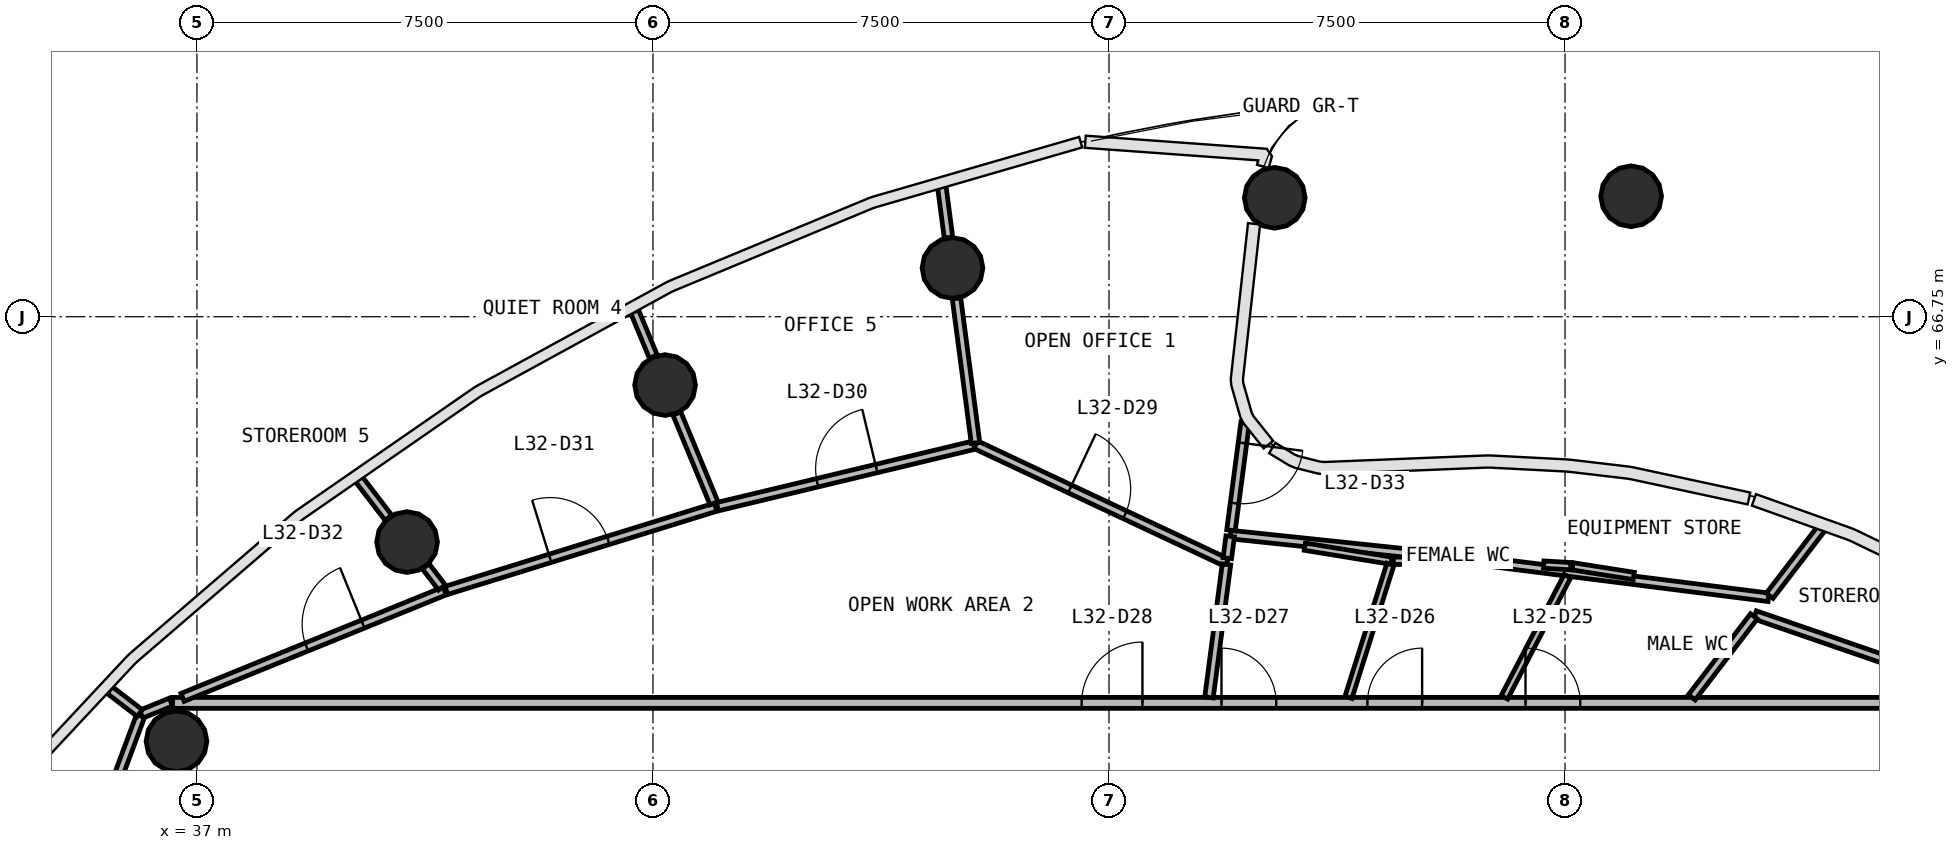
"""IFC4 building model, lengths in metres.
Left out: names, types, materials, properties, quantities, classifications, styles, units other than length and angle.
Written with IfcOpenShell. Run it as: python <this file> out.ifc"""

import sys

from ifc_helpers import new_model, si_unit, direction, frame, frame_2d, origin, origin_2d, place, context, subcontext, project, spatial, rectangle, circle, extrude, source, transform, mapped, element, fill, save


model = new_model("IFC4")
c1 = context("Model", 3, precision=1e-05, world=origin(), true_north=direction((0.0, 1.0)))
c2 = subcontext(c1, "Body", "Model", "MODEL_VIEW")
j1 = project(units=[si_unit("LENGTHUNIT", "METRE"), si_unit("PLANEANGLEUNIT", "RADIAN")], contexts=[c1])
p1 = place(None, origin())
s1 = spatial("IfcSite", under=j1, at=p1, CompositionType="ELEMENT")
p2 = place(p1, origin())
s2 = spatial("IfcBuilding", under=s1, at=p2, CompositionType="ELEMENT")
p3 = place(p2, frame((0.0, 0.0, 137.0)))
s3 = spatial("IfcBuildingStorey", under=s2, at=p3, CompositionType="ELEMENT", Elevation=137.0)
m1 = source(origin(), c2, "Body", "SweptSolid", [
    extrude(circle(Radius=0.5, at=origin_2d()), origin(), (0.0, 0.0, 1.0), 3.9),
])
for number, where, z_axis, x_axis in (
    (1, (60.587, 68.731, 0.0), (0.0, 0.0, 1.0), (1.0, 0.0, 0.0)),
    (2, (54.726, 68.705, 0.0), (0.0, 0.0, 1.0), (1.0, 0.0, 0.0)),
    (3, (49.426, 67.551, 0.0), (0.0, 0.0, 1.0), (1.0, 0.0, 0.0)),
    (4, (44.699, 65.626, 0.0), (0.0, 0.0, 1.0), (1.0, 0.0, 0.0)),
    (5, (40.456, 63.044, 0.0), (0.0, 0.0, 1.0), (1.0, 0.0, 0.0)),
    (6, (36.664, 59.768, 0.0), (0.0, 0.0, 1.0), (1.0, 0.0, 0.0)),
):
    element("IfcColumn", number, at=place(p3, frame(where, z_axis=z_axis, x_axis=x_axis)), inside=s3, PredefinedType="COLUMN", context=c2, shape_type="MappedRepresentation", body=[
        mapped(m1, transform((0.0, 0.0, 0.0), scale=1.0)),
    ])
p4 = place(p3, frame((36.6, 60.4, 0.0), z_axis=(0.0, 0.0, 1.0), x_axis=(1.0, 0.0, 0.0)))
e7 = element("IfcWall", 7, at=p4, inside=s3, PredefinedType="PARTITIONING", context=c2, shape_type="SweptSolid", body=[
    extrude(rectangle(XDim=30.8, YDim=0.18, at=frame_2d((15.4, 0.0))), origin(), (0.0, 0.0, 1.0), 2.88),
])
p5 = place(p4, frame((22.25, 0.0, 0.0)))
e8 = element("IfcOpeningElement", 8, at=p5, cuts=e7, PredefinedType="OPENING", context=c2, shape_type="SweptSolid", body=[
    extrude(rectangle(XDim=0.9, YDim=2.1, at=frame_2d((0.45, 1.05))), frame((0.0, 0.1, 0.0), z_axis=(0.0, -1.0, 0.0), x_axis=(1.0, 0.0, 0.0)), (0.0, 0.0, 1.0), 0.2),
])
p6 = place(p4, frame((19.65, 0.0, 0.0)))
e9 = element("IfcOpeningElement", 9, at=p6, cuts=e7, PredefinedType="OPENING", context=c2, shape_type="SweptSolid", body=[
    extrude(rectangle(XDim=0.9, YDim=2.1, at=frame_2d((0.45, 1.05))), frame((0.0, 0.1, 0.0), z_axis=(0.0, -1.0, 0.0), x_axis=(1.0, 0.0, 0.0)), (0.0, 0.0, 1.0), 0.2),
])
p7 = place(p4, frame((17.25, 0.0, 0.0)))
e10 = element("IfcOpeningElement", 10, at=p7, cuts=e7, PredefinedType="OPENING", context=c2, shape_type="SweptSolid", body=[
    extrude(rectangle(XDim=0.9, YDim=2.1, at=frame_2d((0.45, 1.05))), frame((0.0, 0.1, 0.0), z_axis=(0.0, -1.0, 0.0), x_axis=(1.0, 0.0, 0.0)), (0.0, 0.0, 1.0), 0.2),
])
p8 = place(p4, frame((14.95, 0.0, 0.0)))
e11 = element("IfcOpeningElement", 11, at=p8, cuts=e7, PredefinedType="OPENING", context=c2, shape_type="SweptSolid", body=[
    extrude(rectangle(XDim=1.0, YDim=2.1, at=frame_2d((0.5, 1.05))), frame((0.0, 0.1, 0.0), z_axis=(0.0, -1.0, 0.0), x_axis=(1.0, 0.0, 0.0)), (0.0, 0.0, 1.0), 0.2),
])
p9 = place(p3, frame((36.573, 60.413, 0.0), z_axis=(0.0, 0.0, 1.0), x_axis=(-0.926456511484, -0.376401822961, 0.0)))
e12 = element("IfcWall", 12, at=p9, inside=s3, PredefinedType="PARTITIONING", context=c2, shape_type="SweptSolid", body=[
    extrude(rectangle(XDim=0.529, YDim=0.14, at=frame_2d((0.264, 0.0))), origin(), (0.0, 0.0, 1.0), 2.88),
])
p10 = place(p3, frame((36.763, 60.49, 0.0), z_axis=(0.0, 0.0, 1.0), x_axis=(0.926531191785, 0.376217956309, 0.0)))
e13 = element("IfcWall", 13, at=p10, inside=s3, PredefinedType="PARTITIONING", context=c2, shape_type="SweptSolid", body=[
    extrude(rectangle(XDim=4.652, YDim=0.14, at=frame_2d((2.326, 0.0))), origin(), (0.0, 0.0, 1.0), 2.88),
])
p11 = place(p10, frame((2.202, 0.0, 0.0)))
e14 = element("IfcOpeningElement", 14, at=p11, cuts=e13, PredefinedType="OPENING", context=c2, shape_type="SweptSolid", body=[
    extrude(rectangle(XDim=1.0, YDim=2.1, at=frame_2d((0.5, 1.05))), frame((0.0, 0.08, 0.0), z_axis=(0.0, -1.0, 0.0), x_axis=(1.0, 0.0, 0.0)), (0.0, 0.0, 1.0), 0.16),
])
p12 = place(p3, frame((34.272, 55.343, 0.0), z_axis=(0.0, 0.0, 1.0), x_axis=(0.348465337837, 0.937321667479, 0.0)))
e15 = element("IfcWall", 15, at=p12, inside=s3, PredefinedType="PARTITIONING", context=c2, shape_type="SweptSolid", body=[
    extrude(rectangle(XDim=5.166, YDim=0.14, at=frame_2d((2.583, 0.0))), origin(), (0.0, 0.0, 1.0), 2.88),
])
p13 = place(p12, frame((2.116, 0.0, 0.0)))
e16 = element("IfcOpeningElement", 16, at=p13, cuts=e15, PredefinedType="OPENING", context=c2, shape_type="SweptSolid", body=[
    extrude(rectangle(XDim=1.0, YDim=2.1, at=frame_2d((0.5, 1.05))), frame((0.0, 0.08, 0.0), z_axis=(0.0, -1.0, 0.0), x_axis=(1.0, 0.0, 0.0)), (0.0, 0.0, 1.0), 0.16),
])
p14 = place(p3, frame((62.847, 62.136, 0.0), z_axis=(0.0, 0.0, 1.0), x_axis=(-0.992110428367, 0.125367052792, 0.0)))
e17 = element("IfcWall", 17, at=p14, inside=s3, PredefinedType="PARTITIONING", context=c2, shape_type="SweptSolid", body=[
    extrude(rectangle(XDim=4.781, YDim=0.14, at=frame_2d((2.39, 0.0))), origin(), (0.0, 0.0, 1.0), 2.88),
])
p15 = place(p3, frame((41.102, 62.249, 0.0), z_axis=(0.0, 0.0, 1.0), x_axis=(0.955371566551, 0.295406787033, 0.0)))
e18 = element("IfcWall", 18, at=p15, inside=s3, PredefinedType="PARTITIONING", context=c2, shape_type="SweptSolid", body=[
    extrude(rectangle(XDim=4.635, YDim=0.14, at=frame_2d((2.318, 0.0))), origin(), (0.0, 0.0, 1.0), 2.88),
])
p16 = place(p15, frame((1.786, 0.0, 0.0)))
e19 = element("IfcOpeningElement", 19, at=p16, cuts=e18, PredefinedType="OPENING", context=c2, shape_type="SweptSolid", body=[
    extrude(rectangle(XDim=1.0, YDim=2.1, at=frame_2d((0.5, 1.05))), frame((0.0, 0.08, 0.0), z_axis=(0.0, -1.0, 0.0), x_axis=(1.0, 0.0, 0.0)), (0.0, 0.0, 1.0), 0.16),
])
p17 = place(p3, frame((49.809, 64.645, 0.0), z_axis=(0.0, 0.0, 1.0), x_axis=(0.905123018759, -0.425149762922, 0.0)))
e20 = element("IfcWall", 20, at=p17, inside=s3, PredefinedType="PARTITIONING", context=c2, shape_type="SweptSolid", body=[
    extrude(rectangle(XDim=4.56, YDim=0.14, at=frame_2d((2.28, 0.0))), origin(), (0.0, 0.0, 1.0), 2.88),
])
p18 = place(p17, frame((1.71, 0.0, 0.0)))
e21 = element("IfcOpeningElement", 21, at=p18, cuts=e20, PredefinedType="OPENING", context=c2, shape_type="SweptSolid", body=[
    extrude(rectangle(XDim=1.0, YDim=2.1, at=frame_2d((0.5, 1.05))), frame((0.0, 0.08, 0.0), z_axis=(0.0, -1.0, 0.0), x_axis=(1.0, 0.0, 0.0)), (0.0, 0.0, 1.0), 0.16),
])
p19 = place(p3, frame((66.567, 60.49, 0.0), z_axis=(0.0, 0.0, 1.0), x_axis=(-0.94557008328, 0.325418526834, 0.0)))
e22 = element("IfcWall", 22, at=p19, inside=s3, PredefinedType="PARTITIONING", context=c2, shape_type="SweptSolid", body=[
    extrude(rectangle(XDim=4.169, YDim=0.14, at=frame_2d((2.084, 0.0))), origin(), (0.0, 0.0, 1.0), 2.88),
])
p20 = place(p3, frame((45.56, 63.625, 0.0), z_axis=(0.0, 0.0, 1.0), x_axis=(0.972376576892, 0.233417635821, 0.0)))
e23 = element("IfcWall", 23, at=p20, inside=s3, PredefinedType="PARTITIONING", context=c2, shape_type="SweptSolid", body=[
    extrude(rectangle(XDim=4.34, YDim=0.14, at=frame_2d((2.17, 0.0))), origin(), (0.0, 0.0, 1.0), 2.88),
])
p21 = place(p20, frame((1.689, 0.0, 0.0)))
e24 = element("IfcOpeningElement", 24, at=p21, cuts=e23, PredefinedType="OPENING", context=c2, shape_type="SweptSolid", body=[
    extrude(rectangle(XDim=1.0, YDim=2.1, at=frame_2d((0.5, 1.05))), frame((0.0, 0.08, 0.0), z_axis=(0.0, -1.0, 0.0), x_axis=(1.0, 0.0, 0.0)), (0.0, 0.0, 1.0), 0.16),
])
p22 = place(p3, frame((58.074, 62.739, 0.0), z_axis=(0.0, 0.0, 1.0), x_axis=(-0.994510346773, 0.104638282489, 0.0)))
e25 = element("IfcWall", 25, at=p22, inside=s3, PredefinedType="PARTITIONING", context=c2, shape_type="SweptSolid", body=[
    extrude(rectangle(XDim=4.099, YDim=0.14, at=frame_2d((2.05, 0.0))), origin(), (0.0, 0.0, 1.0), 2.88),
])
p23 = place(p3, frame((49.805, 64.675, 0.0), z_axis=(0.0, 0.0, 1.0), x_axis=(-0.130475590665, 0.991451521881, 0.0)))
e26 = element("IfcWall", 26, at=p23, inside=s3, PredefinedType="PARTITIONING", context=c2, shape_type="SweptSolid", body=[
    extrude(rectangle(XDim=2.397, YDim=0.14, at=frame_2d((1.198, 0.0))), origin(), (0.0, 0.0, 1.0), 2.88),
])
p24 = place(p3, frame((53.644, 60.49, 0.0), z_axis=(0.0, 0.0, 1.0), x_axis=(0.13051751215, 0.991446004088, 0.0)))
e27 = element("IfcWall", 27, at=p24, inside=s3, PredefinedType="PARTITIONING", context=c2, shape_type="SweptSolid", body=[
    extrude(rectangle(XDim=2.205, YDim=0.14, at=frame_2d((1.103, 0.0))), origin(), (0.0, 0.0, 1.0), 2.88),
])
p25 = place(p3, frame((54.24, 65.013, 0.0), z_axis=(0.0, 0.0, 1.0), x_axis=(-0.130458038882, -0.991453831548, 0.0)))
e28 = element("IfcWall", 28, at=p25, inside=s3, PredefinedType="PARTITIONING", context=c2, shape_type="SweptSolid", body=[
    extrude(rectangle(XDim=1.791, YDim=0.14, at=frame_2d((0.896, 0.0))), origin(), (0.0, 0.0, 1.0), 2.88),
])
p26 = place(p25, frame((0.341, 0.0, 0.0)))
e29 = element("IfcOpeningElement", 29, at=p26, cuts=e28, PredefinedType="OPENING", context=c2, shape_type="SweptSolid", body=[
    extrude(rectangle(XDim=1.0, YDim=2.1, at=frame_2d((0.5, 1.05))), frame((0.0, 0.08, 0.0), z_axis=(0.0, -1.0, 0.0), x_axis=(1.0, 0.0, 0.0)), (0.0, 0.0, 1.0), 0.16),
])
p27 = place(p3, frame((62.865, 62.16, 0.0), z_axis=(0.0, 0.0, 1.0), x_axis=(0.608793777292, 0.793328517532, 0.0)))
e30 = element("IfcWall", 30, at=p27, inside=s3, PredefinedType="PARTITIONING", context=c2, shape_type="SweptSolid", body=[
    extrude(rectangle(XDim=1.429, YDim=0.14, at=frame_2d((0.714, 0.0))), origin(), (0.0, 0.0, 1.0), 2.88),
])
p28 = place(p3, frame((61.584, 60.49, 0.0), z_axis=(0.0, 0.0, 1.0), x_axis=(0.608776244605, 0.793341971664, 0.0)))
e31 = element("IfcWall", 31, at=p28, inside=s3, PredefinedType="PARTITIONING", context=c2, shape_type="SweptSolid", body=[
    extrude(rectangle(XDim=1.68, YDim=0.14, at=frame_2d((0.84, 0.0))), origin(), (0.0, 0.0, 1.0), 2.88),
])
p29 = place(p3, frame((45.504, 63.683, 0.0), z_axis=(0.0, 0.0, 1.0), x_axis=(-0.382770137499, 0.923843613302, 0.0)))
e32 = element("IfcWall", 32, at=p29, inside=s3, PredefinedType="PARTITIONING", context=c2, shape_type="SweptSolid", body=[
    extrude(rectangle(XDim=1.598, YDim=0.14, at=frame_2d((0.799, 0.0))), origin(), (0.0, 0.0, 1.0), 2.88),
])
p30 = place(p3, frame((49.36, 68.052, 0.0), z_axis=(0.0, 0.0, 1.0), x_axis=(-0.130499323257, 0.99144839837, 0.0)))
e33 = element("IfcWall", 33, at=p30, inside=s3, PredefinedType="PARTITIONING", context=c2, shape_type="SweptSolid", body=[
    extrude(rectangle(XDim=0.846, YDim=0.14, at=frame_2d((0.423, 0.0))), origin(), (0.0, 0.0, 1.0), 2.88),
])
p31 = place(p3, frame((44.506, 66.092, 0.0), z_axis=(0.0, 0.0, 1.0), x_axis=(-0.382655293316, 0.923891187585, 0.0)))
e34 = element("IfcWall", 34, at=p31, inside=s3, PredefinedType="PARTITIONING", context=c2, shape_type="SweptSolid", body=[
    extrude(rectangle(XDim=0.805, YDim=0.14, at=frame_2d((0.403, 0.0))), origin(), (0.0, 0.0, 1.0), 2.88),
])
p32 = place(p3, frame((40.149, 63.445, 0.0), z_axis=(0.0, 0.0, 1.0), x_axis=(-0.60864917868, 0.793439460383, 0.0)))
e35 = element("IfcWall", 35, at=p32, inside=s3, PredefinedType="PARTITIONING", context=c2, shape_type="SweptSolid", body=[
    extrude(rectangle(XDim=0.801, YDim=0.14, at=frame_2d((0.4, 0.0))), origin(), (0.0, 0.0, 1.0), 2.88),
])
p33 = place(p3, frame((36.059, 60.232, 0.0), z_axis=(0.0, 0.0, 1.0), x_axis=(-0.79330932609, 0.608818785139, 0.0)))
e36 = element("IfcWall", 36, at=p33, inside=s3, PredefinedType="PARTITIONING", context=c2, shape_type="SweptSolid", body=[
    extrude(rectangle(XDim=0.622, YDim=0.14, at=frame_2d((0.311, 0.0))), origin(), (0.0, 0.0, 1.0), 2.88),
])
p34 = place(p3, frame((41.029, 62.298, 0.0), z_axis=(0.0, 0.0, 1.0), x_axis=(-0.608548852833, 0.793516410489, 0.0)))
e37 = element("IfcWall", 37, at=p34, inside=s3, PredefinedType="PARTITIONING", context=c2, shape_type="SweptSolid", body=[
    extrude(rectangle(XDim=0.437, YDim=0.14, at=frame_2d((0.219, 0.0))), origin(), (0.0, 0.0, 1.0), 2.88),
])
p35 = place(p3, frame((53.946, 62.779, 0.0), z_axis=(0.0, 0.0, 1.0), x_axis=(0.130262459178, 0.991479546803, 0.0)))
e38 = element("IfcWall", 38, at=p35, inside=s3, PredefinedType="PARTITIONING", context=c2, shape_type="SweptSolid", body=[
    extrude(rectangle(XDim=0.362, YDim=0.14, at=frame_2d((0.181, 0.0))), origin(), (0.0, 0.0, 1.0), 2.88),
])
p36 = place(p3, frame((60.63, 62.487, 0.0), z_axis=(0.0, 0.0, 1.0), x_axis=(-0.987714333962, 0.156270261039, 0.0)))
e39 = element("IfcWall", 39, at=p36, inside=s3, PredefinedType="PARTITIONING", context=c2, shape_type="SweptSolid", body=[
    extrude(rectangle(XDim=1.019, YDim=0.12, at=frame_2d((0.509, 0.0))), origin(), (0.0, 0.0, 1.0), 2.88),
])
p37 = place(p3, frame((56.646, 62.736, 0.0), z_axis=(0.0, 0.0, 1.0), x_axis=(-0.987012882101, 0.160641123522, 0.0)))
e40 = element("IfcWall", 40, at=p37, inside=s3, PredefinedType="PARTITIONING", context=c2, shape_type="SweptSolid", body=[
    extrude(rectangle(XDim=1.444, YDim=0.12, at=frame_2d((0.722, 0.0))), origin(), (0.0, 0.0, 1.0), 2.88),
])
p38 = place(p3, frame((55.938, 60.49, 0.0), z_axis=(0.0, 0.0, 1.0), x_axis=(0.300739313471, 0.953706383188, 0.0)))
e41 = element("IfcWall", 41, at=p38, inside=s3, PredefinedType="PARTITIONING", context=c2, shape_type="SweptSolid", body=[
    extrude(rectangle(XDim=2.295, YDim=0.12, at=frame_2d((1.147, 0.0))), origin(), (0.0, 0.0, 1.0), 2.88),
])
p39 = place(p3, frame((58.502, 60.49, 0.0), z_axis=(0.0, 0.0, 1.0), x_axis=(0.461711861274, 0.887029964071, 0.0)))
e42 = element("IfcWall", 42, at=p39, inside=s3, PredefinedType="PARTITIONING", context=c2, shape_type="SweptSolid", body=[
    extrude(rectangle(XDim=2.247, YDim=0.12, at=frame_2d((1.124, 0.0))), origin(), (0.0, 0.0, 1.0), 2.88),
])
p40 = place(p3, frame((59.594, 62.647, 0.0), z_axis=(0.0, 0.0, 1.0), x_axis=(-0.998280036491, 0.058625666248, 0.0)))
e43 = element("IfcWall", 43, at=p40, inside=s3, PredefinedType="PARTITIONING", context=c2, shape_type="SweptSolid", body=[
    extrude(rectangle(XDim=0.446, YDim=0.12, at=frame_2d((0.223, 0.0))), origin(), (0.0, 0.0, 1.0), 2.88),
])
p41 = place(p3, frame((57.43, 62.736, 0.0), z_axis=(0.0, 0.0, 1.0), x_axis=(-0.999999790263, 0.000647668258, 0.0)))
e44 = element("IfcWall", 44, at=p41, inside=s3, PredefinedType="PARTITIONING", context=c2, shape_type="SweptSolid", body=[
    extrude(rectangle(XDim=0.754, YDim=0.12, at=frame_2d((0.377, 0.0))), origin(), (0.0, 0.0, 1.0), 2.88),
])
m2 = source(origin(), c2, "Body", "SweptSolid", [
    extrude(rectangle(XDim=0.9, YDim=2.1, at=frame_2d((0.45, 1.05))), frame((0.0, 0.025, 0.0), z_axis=(0.0, -1.0, 0.0), x_axis=(1.0, 0.0, 0.0)), (0.0, 0.0, 1.0), 0.05),
])
p42 = place(p5, origin())
e45 = element("IfcDoor", 45, at=p42, inside=s3, OperationType="SINGLE_SWING_LEFT", PredefinedType="DOOR", context=c2, shape_type="MappedRepresentation", body=[
    mapped(m2, transform((0.0, 0.0, 0.0), scale=1.0)),
])
fill(e8, e45)
p43 = place(p6, origin())
e46 = element("IfcDoor", 46, at=p43, inside=s3, OperationType="SINGLE_SWING_RIGHT", PredefinedType="DOOR", context=c2, shape_type="MappedRepresentation", body=[
    mapped(m2, transform((0.0, 0.0, 0.0), scale=1.0)),
])
fill(e9, e46)
p44 = place(p7, origin())
e47 = element("IfcDoor", 47, at=p44, inside=s3, OperationType="SINGLE_SWING_LEFT", PredefinedType="DOOR", context=c2, shape_type="MappedRepresentation", body=[
    mapped(m2, transform((0.0, 0.0, 0.0), scale=1.0)),
])
fill(e10, e47)
m3 = source(origin(), c2, "Body", "SweptSolid", [
    extrude(rectangle(XDim=1.0, YDim=2.1, at=frame_2d((0.5, 1.05))), frame((0.0, 0.025, 0.0), z_axis=(0.0, -1.0, 0.0), x_axis=(1.0, 0.0, 0.0)), (0.0, 0.0, 1.0), 0.05),
])
p45 = place(p8, origin())
e48 = element("IfcDoor", 48, at=p45, inside=s3, OperationType="SINGLE_SWING_RIGHT", PredefinedType="DOOR", context=c2, shape_type="MappedRepresentation", body=[
    mapped(m3, transform((0.0, 0.0, 0.0), scale=1.0)),
])
fill(e11, e48)
p46 = place(p18, origin())
e49 = element("IfcDoor", 49, at=p46, inside=s3, OperationType="SINGLE_SWING_LEFT", PredefinedType="DOOR", context=c2, shape_type="MappedRepresentation", body=[
    mapped(m3, transform((0.0, 0.0, 0.0), scale=1.0)),
])
fill(e21, e49)
p47 = place(p21, origin())
e50 = element("IfcDoor", 50, at=p47, inside=s3, OperationType="SINGLE_SWING_RIGHT", PredefinedType="DOOR", context=c2, shape_type="MappedRepresentation", body=[
    mapped(m3, transform((0.0, 0.0, 0.0), scale=1.0)),
])
fill(e24, e50)
p48 = place(p16, origin())
e51 = element("IfcDoor", 51, at=p48, inside=s3, OperationType="SINGLE_SWING_LEFT", PredefinedType="DOOR", context=c2, shape_type="MappedRepresentation", body=[
    mapped(m3, transform((0.0, 0.0, 0.0), scale=1.0)),
])
fill(e19, e51)
p49 = place(p11, origin())
e52 = element("IfcDoor", 52, at=p49, inside=s3, OperationType="SINGLE_SWING_RIGHT", PredefinedType="DOOR", context=c2, shape_type="MappedRepresentation", body=[
    mapped(m3, transform((0.0, 0.0, 0.0), scale=1.0)),
])
fill(e14, e52)
p50 = place(p26, origin())
e53 = element("IfcDoor", 53, at=p50, inside=s3, OperationType="SINGLE_SWING_LEFT", PredefinedType="DOOR", context=c2, shape_type="MappedRepresentation", body=[
    mapped(m3, transform((0.0, 0.0, 0.0), scale=1.0)),
])
fill(e29, e53)
save(model, sys.argv[1])
